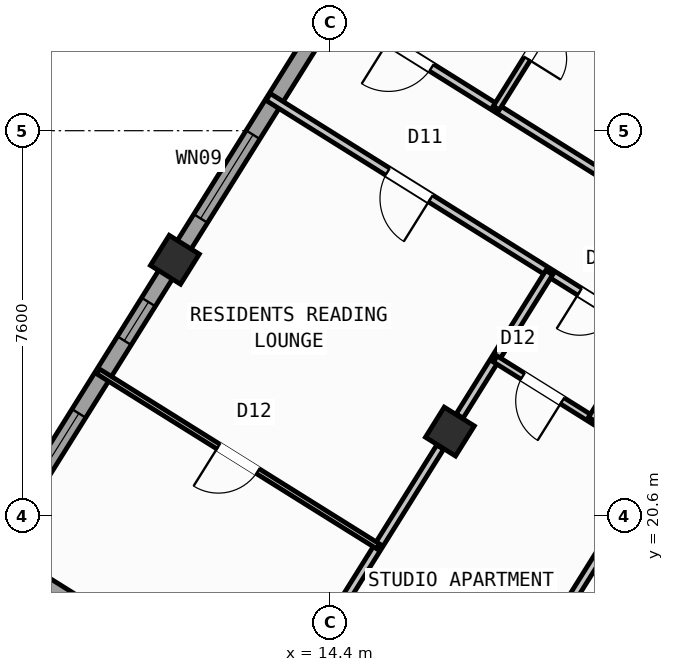
"""IFC4 building model, lengths in metres.
Left out: names, types, materials, properties, quantities, classifications, styles, units other than length and angle.
Written with IfcOpenShell. Run it as: python <this file> out.ifc"""

import sys

from ifc_helpers import new_model, si_unit, direction, frame, frame_2d, origin, origin_2d, place, context, subcontext, project, spatial, rectangle, hollow_rectangle, extrude, source, transform, mapped, element, fill, save


model = new_model("IFC4")
c1 = context("Model", 3, precision=1e-05, world=origin(), true_north=direction((0.0, 1.0)))
c2 = subcontext(c1, "Body", "Model", "MODEL_VIEW")
j1 = project(units=[si_unit("LENGTHUNIT", "METRE"), si_unit("PLANEANGLEUNIT", "RADIAN")], contexts=[c1])
p1 = place(None, origin())
s1 = spatial("IfcSite", under=j1, at=p1, CompositionType="ELEMENT")
p2 = place(p1, origin())
s2 = spatial("IfcBuilding", under=s1, at=p2, CompositionType="ELEMENT")
p3 = place(p2, frame((0.0, 0.0, 295.2)))
s3 = spatial("IfcBuildingStorey", under=s2, at=p3, CompositionType="ELEMENT", Elevation=295.2)
m1 = source(origin(), c2, "Body", "SweptSolid", [
    extrude(hollow_rectangle(XDim=0.7, YDim=0.7, WallThickness=0.028, at=origin_2d()), origin(), (0.0, 0.0, 1.0), 3.6),
])
for number, where, z_axis, x_axis in (
    (1, (16.764, 22.261, 0.0), (0.0, 0.0, 1.0), (-0.848, 0.53, 0.0)),
    (2, (11.336, 25.653, 0.0), (0.0, 0.0, 1.0), (-0.848, 0.53, 0.0)),
):
    element("IfcColumn", number, at=place(p3, frame(where, z_axis=z_axis, x_axis=x_axis)), inside=s3, PredefinedType="COLUMN", context=c2, shape_type="MappedRepresentation", body=[
        mapped(m1, transform((0.0, 0.0, 0.0), scale=1.0)),
    ])
p4 = place(p3, frame((29.268, 6.429, 0.0), z_axis=(0.0, 0.0, 1.0), x_axis=(-0.848048398186, 0.529918780885, 0.0)))
e3 = element("IfcWall", 3, at=p4, inside=s3, PredefinedType="STANDARD", context=c2, shape_type="SweptSolid", body=[
    extrude(rectangle(XDim=25.188, YDim=0.32, at=frame_2d((12.594, 0.0))), origin(), (0.0, 0.0, 1.0), 3.32),
])
p5 = place(p4, frame((16.362, 0.0, 0.0)))
e4 = element("IfcOpeningElement", 4, at=p5, cuts=e3, PredefinedType="OPENING", context=c2, shape_type="SweptSolid", body=[
    extrude(rectangle(XDim=1.2, YDim=2.15, at=frame_2d((0.6, 1.075))), frame((0.0, 0.17, 0.0), z_axis=(0.0, -1.0, 0.0), x_axis=(1.0, 0.0, 0.0)), (0.0, 0.0, 1.0), 0.34),
])
p6 = place(p4, frame((3.859, 0.0, 0.9)))
e5 = element("IfcOpeningElement", 5, at=p6, cuts=e3, PredefinedType="OPENING", context=c2, shape_type="SweptSolid", body=[
    extrude(rectangle(XDim=1.65, YDim=1.45, at=frame_2d((0.825, 0.725))), frame((0.0, 0.17, 0.0), z_axis=(0.0, -1.0, 0.0), x_axis=(1.0, 0.0, 0.0)), (0.0, 0.0, 1.0), 0.34),
])
p7 = place(p4, frame((10.519, 0.0, 0.9)))
e6 = element("IfcOpeningElement", 6, at=p7, cuts=e3, PredefinedType="OPENING", context=c2, shape_type="SweptSolid", body=[
    extrude(rectangle(XDim=1.65, YDim=1.45, at=frame_2d((0.825, 0.725))), frame((0.0, 0.17, 0.0), z_axis=(0.0, -1.0, 0.0), x_axis=(1.0, 0.0, 0.0)), (0.0, 0.0, 1.0), 0.34),
])
p8 = place(p4, frame((21.156, 0.0, 0.95)))
e7 = element("IfcOpeningElement", 7, at=p8, cuts=e3, PredefinedType="OPENING", context=c2, shape_type="SweptSolid", body=[
    extrude(rectangle(XDim=1.95, YDim=1.35, at=frame_2d((0.975, 0.675))), frame((0.0, 0.17, 0.0), z_axis=(0.0, -1.0, 0.0), x_axis=(1.0, 0.0, 0.0)), (0.0, 0.0, 1.0), 0.34),
])
p9 = place(p3, frame((7.842, 20.061, 0.0), z_axis=(0.0, 0.0, 1.0), x_axis=(0.529915577903, 0.84805039962, 0.0)))
e8 = element("IfcWall", 8, at=p9, inside=s3, PredefinedType="STANDARD", context=c2, shape_type="SweptSolid", body=[
    extrude(rectangle(XDim=21.587, YDim=0.32, at=frame_2d((10.794, 0.0))), origin(), (0.0, 0.0, 1.0), 3.32),
])
p10 = place(p9, frame((1.368, 0.0, 0.9)))
e9 = element("IfcOpeningElement", 9, at=p10, cuts=e8, PredefinedType="OPENING", context=c2, shape_type="SweptSolid", body=[
    extrude(rectangle(XDim=1.65, YDim=1.45, at=frame_2d((0.825, 0.725))), frame((0.0, 0.17, 0.0), z_axis=(0.0, -1.0, 0.0), x_axis=(1.0, 0.0, 0.0)), (0.0, 0.0, 1.0), 0.34),
])
p11 = place(p9, frame((4.71, 0.0, 1.0)))
e10 = element("IfcOpeningElement", 10, at=p11, cuts=e8, PredefinedType="OPENING", context=c2, shape_type="SweptSolid", body=[
    extrude(rectangle(XDim=0.9, YDim=1.25, at=frame_2d((0.45, 0.625))), frame((0.0, 0.17, 0.0), z_axis=(0.0, -1.0, 0.0), x_axis=(1.0, 0.0, 0.0)), (0.0, 0.0, 1.0), 0.34),
])
p12 = place(p9, frame((7.554, 0.0, 0.95)))
e11 = element("IfcOpeningElement", 11, at=p12, cuts=e8, PredefinedType="OPENING", context=c2, shape_type="SweptSolid", body=[
    extrude(rectangle(XDim=1.95, YDim=1.35, at=frame_2d((0.975, 0.675))), frame((0.0, 0.17, 0.0), z_axis=(0.0, -1.0, 0.0), x_axis=(1.0, 0.0, 0.0)), (0.0, 0.0, 1.0), 0.34),
])
p13 = place(p9, frame((16.744, 0.0, 1.0)))
e12 = element("IfcOpeningElement", 12, at=p13, cuts=e8, PredefinedType="OPENING", context=c2, shape_type="SweptSolid", body=[
    extrude(rectangle(XDim=0.9, YDim=1.25, at=frame_2d((0.45, 0.625))), frame((0.0, 0.17, 0.0), z_axis=(0.0, -1.0, 0.0), x_axis=(1.0, 0.0, 0.0)), (0.0, 0.0, 1.0), 0.34),
])
p14 = place(p9, frame((18.944, 0.0, 1.0)))
e13 = element("IfcOpeningElement", 13, at=p14, cuts=e8, PredefinedType="OPENING", context=c2, shape_type="SweptSolid", body=[
    extrude(rectangle(XDim=0.9, YDim=1.25, at=frame_2d((0.45, 0.625))), frame((0.0, 0.17, 0.0), z_axis=(0.0, -1.0, 0.0), x_axis=(1.0, 0.0, 0.0)), (0.0, 0.0, 1.0), 0.34),
])
p15 = place(p3, frame((19.566, 38.434, 0.0), z_axis=(0.0, 0.0, 1.0), x_axis=(0.84804567626, -0.529923136858, 0.0)))
e14 = element("IfcWall", 14, at=p15, inside=s3, PredefinedType="STANDARD", context=c2, shape_type="SweptSolid", body=[
    extrude(rectangle(XDim=25.188, YDim=0.32, at=frame_2d((12.594, 0.0))), origin(), (0.0, 0.0, 1.0), 3.32),
])
p16 = place(p15, frame((3.55, 0.0, 0.0)))
e15 = element("IfcOpeningElement", 15, at=p16, cuts=e14, PredefinedType="OPENING", context=c2, shape_type="SweptSolid", body=[
    extrude(rectangle(XDim=1.05, YDim=2.15, at=frame_2d((0.525, 1.075))), frame((0.0, 0.17, 0.0), z_axis=(0.0, -1.0, 0.0), x_axis=(1.0, 0.0, 0.0)), (0.0, 0.0, 1.0), 0.34),
])
p17 = place(p15, frame((7.349, 0.0, 0.9)))
e16 = element("IfcOpeningElement", 16, at=p17, cuts=e14, PredefinedType="OPENING", context=c2, shape_type="SweptSolid", body=[
    extrude(rectangle(XDim=1.65, YDim=1.45, at=frame_2d((0.825, 0.725))), frame((0.0, 0.17, 0.0), z_axis=(0.0, -1.0, 0.0), x_axis=(1.0, 0.0, 0.0)), (0.0, 0.0, 1.0), 0.34),
])
p18 = place(p15, frame((10.754, 0.0, 1.0)))
e17 = element("IfcOpeningElement", 17, at=p18, cuts=e14, PredefinedType="OPENING", context=c2, shape_type="SweptSolid", body=[
    extrude(rectangle(XDim=0.9, YDim=1.25, at=frame_2d((0.45, 0.625))), frame((0.0, 0.17, 0.0), z_axis=(0.0, -1.0, 0.0), x_axis=(1.0, 0.0, 0.0)), (0.0, 0.0, 1.0), 0.34),
])
p19 = place(p15, frame((15.169, 0.0, 0.95)))
e18 = element("IfcOpeningElement", 18, at=p19, cuts=e14, PredefinedType="OPENING", context=c2, shape_type="SweptSolid", body=[
    extrude(rectangle(XDim=1.95, YDim=1.35, at=frame_2d((0.975, 0.675))), frame((0.0, 0.17, 0.0), z_axis=(0.0, -1.0, 0.0), x_axis=(1.0, 0.0, 0.0)), (0.0, 0.0, 1.0), 0.34),
])
p20 = place(p15, frame((20.869, 0.0, 0.95)))
e19 = element("IfcOpeningElement", 19, at=p20, cuts=e14, PredefinedType="OPENING", context=c2, shape_type="SweptSolid", body=[
    extrude(rectangle(XDim=1.95, YDim=1.35, at=frame_2d((0.975, 0.675))), frame((0.0, 0.17, 0.0), z_axis=(0.0, -1.0, 0.0), x_axis=(1.0, 0.0, 0.0)), (0.0, 0.0, 1.0), 0.34),
])
p21 = place(p3, frame((21.938, 23.391, 0.0), z_axis=(0.0, 0.0, 1.0), x_axis=(-0.529924725692, -0.848044683434, 0.0)))
e20 = element("IfcWall", 20, at=p21, inside=s3, PredefinedType="PARTITIONING", context=c2, shape_type="SweptSolid", body=[
    extrude(rectangle(XDim=10.35, YDim=0.16, at=frame_2d((5.175, 0.0))), origin(), (0.0, 0.0, 1.0), 3.31),
])
p22 = place(p3, frame((23.104, 25.256, 0.0), z_axis=(0.0, 0.0, 1.0), x_axis=(-0.848043444964, 0.529926707624, 0.0)))
e21 = element("IfcWall", 21, at=p22, inside=s3, PredefinedType="PARTITIONING", context=c2, shape_type="SweptSolid", body=[
    extrude(rectangle(XDim=10.33, YDim=0.16, at=frame_2d((5.165, 0.0))), origin(), (0.0, 0.0, 1.0), 3.31),
])
p23 = place(p22, frame((1.395, 0.0, 0.0)))
e22 = element("IfcOpeningElement", 22, at=p23, cuts=e21, PredefinedType="OPENING", context=c2, shape_type="SweptSolid", body=[
    extrude(rectangle(XDim=1.0, YDim=2.1, at=frame_2d((0.5, 1.05))), frame((0.0, 0.09, 0.0), z_axis=(0.0, -1.0, 0.0), x_axis=(1.0, 0.0, 0.0)), (0.0, 0.0, 1.0), 0.18),
])
p24 = place(p22, frame((7.904, 0.0, 0.0)))
e23 = element("IfcOpeningElement", 23, at=p24, cuts=e21, PredefinedType="OPENING", context=c2, shape_type="SweptSolid", body=[
    extrude(rectangle(XDim=1.0, YDim=2.1, at=frame_2d((0.5, 1.05))), frame((0.0, 0.09, 0.0), z_axis=(0.0, -1.0, 0.0), x_axis=(1.0, 0.0, 0.0)), (0.0, 0.0, 1.0), 0.18),
])
p25 = place(p3, frame((21.938, 23.391, 0.0), z_axis=(0.0, 0.0, 1.0), x_axis=(-0.848050081784, 0.529916086552, 0.0)))
e24 = element("IfcWall", 24, at=p25, inside=s3, PredefinedType="PARTITIONING", context=c2, shape_type="SweptSolid", body=[
    extrude(rectangle(XDim=10.33, YDim=0.16, at=frame_2d((5.165, 0.0))), origin(), (0.0, 0.0, 1.0), 3.31),
])
p26 = place(p25, frame((2.22, 0.0, 0.0)))
e25 = element("IfcOpeningElement", 25, at=p26, cuts=e24, PredefinedType="OPENING", context=c2, shape_type="SweptSolid", body=[
    extrude(rectangle(XDim=0.86, YDim=2.05, at=frame_2d((0.43, 1.025))), frame((0.0, 0.09, 0.0), z_axis=(0.0, -1.0, 0.0), x_axis=(1.0, 0.0, 0.0)), (0.0, 0.0, 1.0), 0.18),
])
p27 = place(p25, frame((6.55, 0.0, 0.0)))
e26 = element("IfcOpeningElement", 26, at=p27, cuts=e24, PredefinedType="OPENING", context=c2, shape_type="SweptSolid", body=[
    extrude(rectangle(XDim=1.0, YDim=2.1, at=frame_2d((0.5, 1.05))), frame((0.0, 0.09, 0.0), z_axis=(0.0, -1.0, 0.0), x_axis=(1.0, 0.0, 0.0)), (0.0, 0.0, 1.0), 0.18),
])
p28 = place(p3, frame((18.724, 25.399, 0.0), z_axis=(0.0, 0.0, 1.0), x_axis=(-0.529952920244, -0.848027064618, 0.0)))
e27 = element("IfcWall", 27, at=p28, inside=s3, PredefinedType="PARTITIONING", context=c2, shape_type="SweptSolid", body=[
    extrude(rectangle(XDim=3.338, YDim=0.16, at=frame_2d((1.669, 0.0))), origin(), (0.0, 0.0, 1.0), 3.31),
])
p29 = place(p3, frame((16.572, 21.954, 0.0), z_axis=(0.0, 0.0, 1.0), x_axis=(-0.529904903214, -0.848057069748, 0.0)))
e28 = element("IfcWall", 28, at=p29, inside=s3, PredefinedType="PARTITIONING", context=c2, shape_type="SweptSolid", body=[
    extrude(rectangle(XDim=5.601, YDim=0.16, at=frame_2d((2.801, 0.0))), origin(), (0.0, 0.0, 1.0), 3.31),
])
p30 = place(p3, frame((20.873, 21.686, 0.0), z_axis=(0.0, 0.0, 1.0), x_axis=(-0.84803087207, 0.529946827537, 0.0)))
e29 = element("IfcWall", 29, at=p30, inside=s3, PredefinedType="PLUMBINGWALL", context=c2, shape_type="SweptSolid", body=[
    extrude(rectangle(XDim=3.79, YDim=0.14, at=frame_2d((1.895, 0.0))), origin(), (0.0, 0.0, 1.0), 3.31),
])
p31 = place(p30, frame((2.23, 0.0, 0.0)))
e30 = element("IfcOpeningElement", 30, at=p31, cuts=e29, PredefinedType="OPENING", context=c2, shape_type="SweptSolid", body=[
    extrude(rectangle(XDim=0.92, YDim=2.08, at=frame_2d((0.46, 1.04))), frame((0.0, 0.08, 0.0), z_axis=(0.0, -1.0, 0.0), x_axis=(1.0, 0.0, 0.0)), (0.0, 0.0, 1.0), 0.16),
])
p32 = place(p3, frame((20.624, 24.212, 0.0), z_axis=(0.0, 0.0, 1.0), x_axis=(-0.529933431478, -0.848039243315, 0.0)))
e31 = element("IfcWall", 31, at=p32, inside=s3, PredefinedType="PLUMBINGWALL", context=c2, shape_type="SweptSolid", body=[
    extrude(rectangle(XDim=2.01, YDim=0.14, at=frame_2d((1.005, 0.0))), origin(), (0.0, 0.0, 1.0), 3.31),
])
p33 = place(p32, frame((0.615, 0.0, 0.0)))
e32 = element("IfcOpeningElement", 32, at=p33, cuts=e31, PredefinedType="OPENING", context=c2, shape_type="SweptSolid", body=[
    extrude(rectangle(XDim=0.78, YDim=2.05, at=frame_2d((0.39, 1.025))), frame((0.0, 0.08, 0.0), z_axis=(0.0, -1.0, 0.0), x_axis=(1.0, 0.0, 0.0)), (0.0, 0.0, 1.0), 0.16),
])
p34 = place(p3, frame((15.348, 19.995, 0.0), z_axis=(0.0, 0.0, 1.0), x_axis=(-0.848048787466, 0.529918157905, 0.0)))
e33 = element("IfcWall", 33, at=p34, inside=s3, PredefinedType="PARTITIONING", context=c2, shape_type="SweptSolid", body=[
    extrude(rectangle(XDim=6.52, YDim=0.11, at=frame_2d((3.26, 0.0))), origin(), (0.0, 0.0, 1.0), 3.31),
])
p35 = place(p34, frame((2.8, 0.0, 0.0)))
e34 = element("IfcOpeningElement", 34, at=p35, cuts=e33, PredefinedType="OPENING", context=c2, shape_type="SweptSolid", body=[
    extrude(rectangle(XDim=0.92, YDim=2.08, at=frame_2d((0.46, 1.04))), frame((0.0, 0.065, 0.0), z_axis=(0.0, -1.0, 0.0), x_axis=(1.0, 0.0, 0.0)), (0.0, 0.0, 1.0), 0.13),
])
p36 = place(p3, frame((19.311, 31.259, 0.0), z_axis=(0.0, 0.0, 1.0), x_axis=(-0.52989206052, -0.848065094316, 0.0)))
e35 = element("IfcWall", 35, at=p36, inside=s3, PredefinedType="PLUMBINGWALL", context=c2, shape_type="SweptSolid", body=[
    extrude(rectangle(XDim=3.08, YDim=0.14, at=frame_2d((1.54, 0.0))), origin(), (0.0, 0.0, 1.0), 3.31),
])
p37 = place(p36, frame((1.15, 0.0, 0.0)))
e36 = element("IfcOpeningElement", 36, at=p37, cuts=e35, PredefinedType="OPENING", context=c2, shape_type="SweptSolid", body=[
    extrude(rectangle(XDim=0.78, YDim=2.05, at=frame_2d((0.39, 1.025))), frame((0.0, 0.08, 0.0), z_axis=(0.0, -1.0, 0.0), x_axis=(1.0, 0.0, 0.0)), (0.0, 0.0, 1.0), 0.16),
])
m2 = source(origin(), c2, "Body", "SweptSolid", [
    extrude(rectangle(XDim=1.65, YDim=1.45, at=frame_2d((0.825, 0.725))), frame((0.0, 0.03, 0.0), z_axis=(0.0, -1.0, 0.0), x_axis=(1.0, 0.0, 0.0)), (0.0, 0.0, 1.0), 0.06),
])
p38 = place(p10, origin())
e37 = element("IfcWindow", 37, at=p38, inside=s3, PartitioningType="SINGLE_PANEL", PredefinedType="WINDOW", context=c2, shape_type="MappedRepresentation", body=[
    mapped(m2, transform((0.0, 0.0, 0.0), scale=1.0)),
])
fill(e9, e37)
m3 = source(origin(), c2, "Body", "SweptSolid", [
    extrude(rectangle(XDim=0.9, YDim=1.25, at=frame_2d((0.45, 0.625))), frame((0.0, 0.03, 0.0), z_axis=(0.0, -1.0, 0.0), x_axis=(1.0, 0.0, 0.0)), (0.0, 0.0, 1.0), 0.06),
])
p39 = place(p11, origin())
e38 = element("IfcWindow", 38, at=p39, inside=s3, PartitioningType="SINGLE_PANEL", PredefinedType="WINDOW", context=c2, shape_type="MappedRepresentation", body=[
    mapped(m3, transform((0.0, 0.0, 0.0), scale=1.0)),
])
fill(e10, e38)
m4 = source(origin(), c2, "Body", "SweptSolid", [
    extrude(rectangle(XDim=1.95, YDim=1.35, at=frame_2d((0.975, 0.675))), frame((0.0, 0.03, 0.0), z_axis=(0.0, -1.0, 0.0), x_axis=(1.0, 0.0, 0.0)), (0.0, 0.0, 1.0), 0.06),
])
p40 = place(p12, origin())
e39 = element("IfcWindow", 39, at=p40, inside=s3, PartitioningType="SINGLE_PANEL", PredefinedType="WINDOW", context=c2, shape_type="MappedRepresentation", body=[
    mapped(m4, transform((0.0, 0.0, 0.0), scale=1.0)),
])
fill(e11, e39)
m5 = source(origin(), c2, "Body", "SweptSolid", [
    extrude(rectangle(XDim=0.86, YDim=2.05, at=frame_2d((0.43, 1.025))), frame((0.0, 0.025, 0.0), z_axis=(0.0, -1.0, 0.0), x_axis=(1.0, 0.0, 0.0)), (0.0, 0.0, 1.0), 0.05),
])
p41 = place(p26, origin())
e40 = element("IfcDoor", 40, at=p41, inside=s3, OperationType="SINGLE_SWING_RIGHT", PredefinedType="DOOR", context=c2, shape_type="MappedRepresentation", body=[
    mapped(m5, transform((0.0, 0.0, 0.0), scale=1.0)),
])
fill(e25, e40)
m6 = source(origin(), c2, "Body", "SweptSolid", [
    extrude(rectangle(XDim=0.92, YDim=2.08, at=frame_2d((0.46, 1.04))), frame((0.0, 0.025, 0.0), z_axis=(0.0, -1.0, 0.0), x_axis=(1.0, 0.0, 0.0)), (0.0, 0.0, 1.0), 0.05),
])
p42 = place(p31, origin())
e41 = element("IfcDoor", 41, at=p42, inside=s3, OperationType="SINGLE_SWING_LEFT", PredefinedType="DOOR", context=c2, shape_type="MappedRepresentation", body=[
    mapped(m6, transform((0.0, 0.0, 0.0), scale=1.0)),
])
fill(e30, e41)
m7 = source(origin(), c2, "Body", "SweptSolid", [
    extrude(rectangle(XDim=1.0, YDim=2.1, at=frame_2d((0.5, 1.05))), frame((0.0, 0.025, 0.0), z_axis=(0.0, -1.0, 0.0), x_axis=(1.0, 0.0, 0.0)), (0.0, 0.0, 1.0), 0.05),
])
p43 = place(p27, origin())
e42 = element("IfcDoor", 42, at=p43, inside=s3, OperationType="SINGLE_SWING_LEFT", PredefinedType="DOOR", context=c2, shape_type="MappedRepresentation", body=[
    mapped(m7, transform((0.0, 0.0, 0.0), scale=1.0)),
])
fill(e26, e42)
p44 = place(p35, origin())
e43 = element("IfcDoor", 43, at=p44, inside=s3, OperationType="SINGLE_SWING_RIGHT", PredefinedType="DOOR", context=c2, shape_type="MappedRepresentation", body=[
    mapped(m6, transform((0.0, 0.0, 0.0), scale=1.0)),
])
fill(e34, e43)
p45 = place(p24, origin())
e44 = element("IfcDoor", 44, at=p45, inside=s3, OperationType="SINGLE_SWING_RIGHT", PredefinedType="DOOR", context=c2, shape_type="MappedRepresentation", body=[
    mapped(m7, transform((0.0, 0.0, 0.0), scale=1.0)),
])
fill(e23, e44)
m8 = source(origin(), c2, "Body", "SweptSolid", [
    extrude(rectangle(XDim=0.78, YDim=2.05, at=frame_2d((0.39, 1.025))), frame((0.0, 0.025, 0.0), z_axis=(0.0, -1.0, 0.0), x_axis=(1.0, 0.0, 0.0)), (0.0, 0.0, 1.0), 0.05),
])
p46 = place(p37, origin())
e45 = element("IfcDoor", 45, at=p46, inside=s3, OperationType="SINGLE_SWING_RIGHT", PredefinedType="DOOR", context=c2, shape_type="MappedRepresentation", body=[
    mapped(m8, transform((0.0, 0.0, 0.0), scale=1.0)),
])
fill(e36, e45)
save(model, sys.argv[1])
